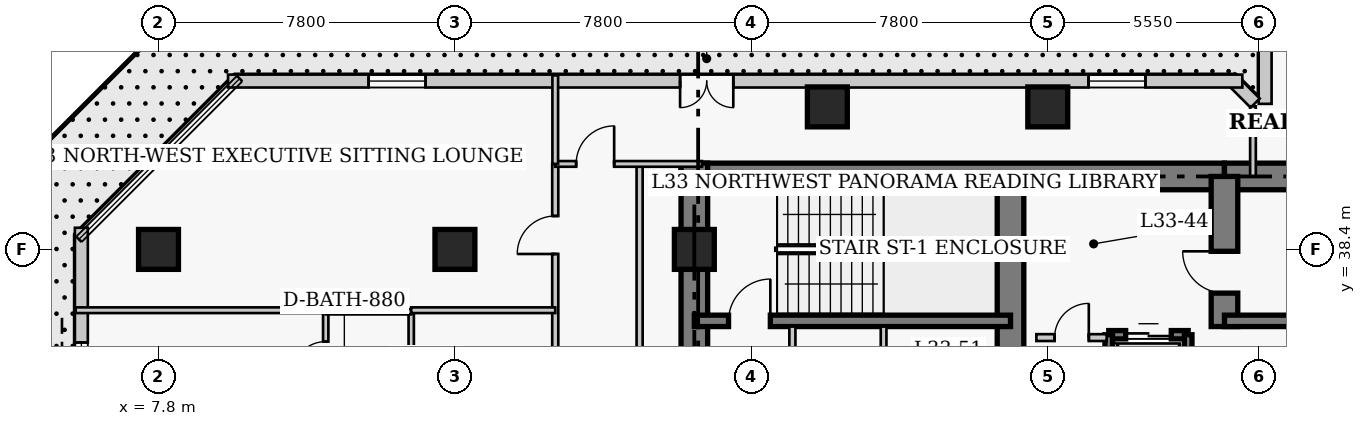
"""IFC4 building model, lengths in metres.
Left out: names, types, materials, properties, quantities, classifications, styles, units other than length and angle.
Written with IfcOpenShell. Run it as: python <this file> out.ifc"""

import sys

from ifc_helpers import new_model, si_unit, direction, frame, frame_2d, origin, origin_2d, place, context, subcontext, project, spatial, rectangle, extrude, element, fill, save


model = new_model("IFC4")
c1 = context("Model", 3, precision=1e-05, world=origin(), true_north=direction((0.0, 1.0)))
c2 = subcontext(c1, "Body", "Model", "MODEL_VIEW")
j1 = project(units=[si_unit("LENGTHUNIT", "METRE"), si_unit("PLANEANGLEUNIT", "RADIAN")], contexts=[c1])
p1 = place(None, origin())
s1 = spatial("IfcSite", under=j1, at=p1, CompositionType="ELEMENT")
p2 = place(p1, origin())
s2 = spatial("IfcBuilding", under=s1, at=p2, CompositionType="ELEMENT")
p3 = place(p2, frame((0.0, 0.0, 134.6)))
s3 = spatial("IfcBuildingStorey", under=s2, at=p3, CompositionType="ELEMENT", Elevation=134.6)
p4 = place(p3, frame((21.55, 40.32, 0.0), z_axis=(0.0, 0.0, 1.0), x_axis=(1.0, 0.0, 0.0)))
e1 = element("IfcWall", 1, at=p4, inside=s3, PredefinedType="SHEAR", context=c2, shape_type="SweptSolid", body=[
    extrude(rectangle(XDim=14.3, YDim=0.7, at=frame_2d((7.15, 0.0))), origin(), (0.0, 0.0, 1.0), 3.8),
])
p5 = place(p3, frame((35.85, 40.32, 0.0), z_axis=(0.0, 0.0, 1.0), x_axis=(1.0, 0.0, 0.0)))
e2 = element("IfcWall", 2, at=p5, inside=s3, PredefinedType="SHEAR", context=c2, shape_type="SweptSolid", body=[
    extrude(rectangle(XDim=12.6, YDim=0.7, at=frame_2d((6.3, 0.0))), origin(), (0.0, 0.0, 1.0), 3.8),
])
p6 = place(p3, frame((21.9, 27.05, 0.0), z_axis=(0.0, 0.0, 1.0), x_axis=(0.0, 1.0, 0.0)))
e3 = element("IfcWall", 3, at=p6, inside=s3, PredefinedType="SHEAR", context=c2, shape_type="SweptSolid", body=[
    extrude(rectangle(XDim=13.62, YDim=0.7, at=frame_2d((6.81, 0.0))), origin(), (0.0, 0.0, 1.0), 3.8),
])
p7 = place(p3, frame((30.22, 33.1, 0.0), z_axis=(0.0, 0.0, 1.0), x_axis=(0.0, 1.0, 0.0)))
e4 = element("IfcWall", 4, at=p7, inside=s3, PredefinedType="SHEAR", context=c2, shape_type="SweptSolid", body=[
    extrude(rectangle(XDim=7.22, YDim=0.7, at=frame_2d((3.61, 0.0))), origin(), (0.0, 0.0, 1.0), 3.8),
])
p8 = place(p3, frame((35.85, 36.37, 0.0), z_axis=(0.0, 0.0, 1.0), x_axis=(0.0, 1.0, 0.0)))
e5 = element("IfcWall", 5, at=p8, inside=s3, PredefinedType="SHEAR", context=c2, shape_type="SweptSolid", body=[
    extrude(rectangle(XDim=3.95, YDim=0.7, at=frame_2d((1.975, 0.0))), origin(), (0.0, 0.0, 1.0), 3.8),
])
p9 = place(p8, frame((0.88, 0.0, 0.0)))
e6 = element("IfcOpeningElement", 6, at=p9, cuts=e5, PredefinedType="OPENING", context=c2, shape_type="SweptSolid", body=[
    extrude(rectangle(XDim=1.1, YDim=2.15, at=frame_2d((0.55, 1.075))), frame((0.0, 0.36, 0.0), z_axis=(0.0, -1.0, 0.0), x_axis=(1.0, 0.0, 0.0)), (0.0, 0.0, 1.0), 0.72),
])
p10 = place(p3, frame((21.9, 36.52, 0.0), z_axis=(0.0, 0.0, 1.0), x_axis=(1.0, 0.0, 0.0)))
e7 = element("IfcWall", 7, at=p10, inside=s3, PredefinedType="SHEAR", context=c2, shape_type="SweptSolid", body=[
    extrude(rectangle(XDim=8.32, YDim=0.3, at=frame_2d((4.16, 0.0))), origin(), (0.0, 0.0, 1.0), 3.8),
])
p11 = place(p10, frame((0.9, 0.0, 0.0)))
e8 = element("IfcOpeningElement", 8, at=p11, cuts=e7, PredefinedType="OPENING", context=c2, shape_type="SweptSolid", body=[
    extrude(rectangle(XDim=1.1, YDim=2.15, at=frame_2d((0.55, 1.075))), frame((0.0, 0.16, 0.0), z_axis=(0.0, -1.0, 0.0), x_axis=(1.0, 0.0, 0.0)), (0.0, 0.0, 1.0), 0.32),
])
p12 = place(p3, frame((35.85, 36.52, 0.0), z_axis=(0.0, 0.0, 1.0), x_axis=(1.0, 0.0, 0.0)))
e9 = element("IfcWall", 9, at=p12, inside=s3, PredefinedType="SHEAR", context=c2, shape_type="SweptSolid", body=[
    extrude(rectangle(XDim=8.33, YDim=0.3, at=frame_2d((4.165, 0.0))), origin(), (0.0, 0.0, 1.0), 3.8),
])
for number, where, z_axis, x_axis in (
    (10, (7.8, 38.4, 0.0), (0.0, 0.0, 1.0), (1.0, 0.0, 0.0)),
    (11, (15.6, 38.4, 0.0), (0.0, 0.0, 1.0), (1.0, 0.0, 0.0)),
    (12, (21.9, 38.4, 0.0), (0.0, 0.0, 1.0), (1.0, 0.0, 0.0)),
    (13, (25.4, 42.15, 0.0), (0.0, 0.0, 1.0), (1.0, 0.0, 0.0)),
    (14, (31.2, 42.15, 0.0), (0.0, 0.0, 1.0), (1.0, 0.0, 0.0)),
):
    element("IfcColumn", number, at=place(p3, frame(where, z_axis=z_axis, x_axis=x_axis)), inside=s3, PredefinedType="COLUMN", context=c2, shape_type="SweptSolid", body=[
        extrude(rectangle(XDim=1.05, YDim=1.05, at=origin_2d()), origin(), (0.0, 0.0, 1.0), 3.8),
    ])
p13 = place(p3, frame((36.92, 44.37, 0.0), z_axis=(0.0, 0.0, 1.0), x_axis=(0.0, -1.0, 0.0)))
e15 = element("IfcWall", 15, at=p13, inside=s3, PredefinedType="SOLIDWALL", context=c2, shape_type="SweptSolid", body=[
    extrude(rectangle(XDim=2.14, YDim=0.34, at=frame_2d((1.07, 0.0))), origin(), (0.0, 0.0, 1.0), 3.55),
])
p14 = place(p3, frame((36.658, 42.251, 0.0), z_axis=(0.0, 0.0, 1.0), x_axis=(-0.707106781187, 0.707106781187, 0.0)))
e16 = element("IfcWall", 16, at=p14, inside=s3, PredefinedType="SOLIDWALL", context=c2, shape_type="SweptSolid", body=[
    extrude(rectangle(XDim=0.929, YDim=0.34, at=frame_2d((0.464, 0.0))), origin(), (0.0, 0.0, 1.0), 3.55),
])
p15 = place(p3, frame((36.32, 42.83, 0.0), z_axis=(0.0, 0.0, 1.0), x_axis=(-1.0, 0.0, 0.0)))
e17 = element("IfcWall", 17, at=p15, inside=s3, PredefinedType="SOLIDWALL", context=c2, shape_type="SweptSolid", body=[
    extrude(rectangle(XDim=26.69, YDim=0.34, at=frame_2d((13.345, 0.0))), origin(), (0.0, 0.0, 1.0), 3.55),
])
p16 = place(p15, frame((13.395, 0.0, 0.0)))
e18 = element("IfcOpeningElement", 18, at=p16, cuts=e17, PredefinedType="OPENING", context=c2, shape_type="SweptSolid", body=[
    extrude(rectangle(XDim=1.4, YDim=2.15, at=frame_2d((0.7, 1.075))), frame((0.0, 0.18, 0.0), z_axis=(0.0, -1.0, 0.0), x_axis=(1.0, 0.0, 0.0)), (0.0, 0.0, 1.0), 0.36),
])
p17 = place(p15, frame((2.548, 0.0, 0.85)))
e19 = element("IfcOpeningElement", 19, at=p17, cuts=e17, PredefinedType="OPENING", context=c2, shape_type="SweptSolid", body=[
    extrude(rectangle(XDim=1.5, YDim=1.75, at=frame_2d((0.75, 0.875))), frame((0.0, 0.18, 0.0), z_axis=(0.0, -1.0, 0.0), x_axis=(1.0, 0.0, 0.0)), (0.0, 0.0, 1.0), 0.36),
])
p18 = place(p15, frame((21.492, 0.0, 0.85)))
e20 = element("IfcOpeningElement", 20, at=p18, cuts=e17, PredefinedType="OPENING", context=c2, shape_type="SweptSolid", body=[
    extrude(rectangle(XDim=1.5, YDim=1.75, at=frame_2d((0.75, 0.875))), frame((0.0, 0.18, 0.0), z_axis=(0.0, -1.0, 0.0), x_axis=(1.0, 0.0, 0.0)), (0.0, 0.0, 1.0), 0.36),
])
p19 = place(p3, frame((5.77, 38.97, 0.0), z_axis=(0.0, 0.0, 1.0), x_axis=(0.0, -1.0, 0.0)))
e21 = element("IfcWall", 21, at=p19, inside=s3, PredefinedType="SOLIDWALL", context=c2, shape_type="SweptSolid", body=[
    extrude(rectangle(XDim=30.14, YDim=0.34, at=frame_2d((15.07, 0.0))), origin(), (0.0, 0.0, 1.0), 3.55),
])
p20 = place(p19, frame((3.018, 0.0, 0.85)))
e22 = element("IfcOpeningElement", 22, at=p20, cuts=e21, PredefinedType="OPENING", context=c2, shape_type="SweptSolid", body=[
    extrude(rectangle(XDim=1.5, YDim=1.75, at=frame_2d((0.75, 0.875))), frame((0.0, 0.18, 0.0), z_axis=(0.0, -1.0, 0.0), x_axis=(1.0, 0.0, 0.0)), (0.0, 0.0, 1.0), 0.36),
])
p21 = place(p19, frame((10.552, 0.0, 0.85)))
e23 = element("IfcOpeningElement", 23, at=p21, cuts=e21, PredefinedType="OPENING", context=c2, shape_type="SweptSolid", body=[
    extrude(rectangle(XDim=1.5, YDim=1.75, at=frame_2d((0.75, 0.875))), frame((0.0, 0.18, 0.0), z_axis=(0.0, -1.0, 0.0), x_axis=(1.0, 0.0, 0.0)), (0.0, 0.0, 1.0), 0.36),
])
p22 = place(p19, frame((18.087, 0.0, 0.85)))
e24 = element("IfcOpeningElement", 24, at=p22, cuts=e21, PredefinedType="OPENING", context=c2, shape_type="SweptSolid", body=[
    extrude(rectangle(XDim=1.5, YDim=1.75, at=frame_2d((0.75, 0.875))), frame((0.0, 0.18, 0.0), z_axis=(0.0, -1.0, 0.0), x_axis=(1.0, 0.0, 0.0)), (0.0, 0.0, 1.0), 0.36),
])
p23 = place(p19, frame((25.623, 0.0, 0.85)))
e25 = element("IfcOpeningElement", 25, at=p23, cuts=e21, PredefinedType="OPENING", context=c2, shape_type="SweptSolid", body=[
    extrude(rectangle(XDim=1.5, YDim=1.75, at=frame_2d((0.75, 0.875))), frame((0.0, 0.18, 0.0), z_axis=(0.0, -1.0, 0.0), x_axis=(1.0, 0.0, 0.0)), (0.0, 0.0, 1.0), 0.36),
])
p24 = place(p3, frame((32.805, 36.155, 0.0), z_axis=(0.0, 0.0, 1.0), x_axis=(1.0, 0.0, 0.0)))
e26 = element("IfcWall", 26, at=p24, inside=s3, PredefinedType="SHEAR", context=c2, shape_type="SweptSolid", body=[
    extrude(rectangle(XDim=2.09, YDim=0.22, at=frame_2d((1.045, 0.0))), origin(), (0.0, 0.0, 1.0), 3.8),
])
p25 = place(p24, frame((0.445, 0.0, 0.0)))
e27 = element("IfcOpeningElement", 27, at=p25, cuts=e26, PredefinedType="OPENING", context=c2, shape_type="SweptSolid", body=[
    extrude(rectangle(XDim=1.2, YDim=2.15, at=frame_2d((0.6, 1.075))), frame((0.0, 0.12, 0.0), z_axis=(0.0, -1.0, 0.0), x_axis=(1.0, 0.0, 0.0)), (0.0, 0.0, 1.0), 0.24),
])
for number, where, z_axis, x_axis in (
    (28, (32.805, 33.245, 0.0), (0.0, 0.0, 1.0), (0.0, 1.0, 0.0)),
    (29, (34.895, 33.245, 0.0), (0.0, 0.0, 1.0), (0.0, 1.0, 0.0)),
):
    element("IfcWall", number, at=place(p3, frame(where, z_axis=z_axis, x_axis=x_axis)), inside=s3, PredefinedType="SHEAR", context=c2, shape_type="SweptSolid", body=[
        extrude(rectangle(XDim=2.91, YDim=0.2, at=frame_2d((1.455, 0.0))), origin(), (0.0, 0.0, 1.0), 3.8),
    ])
p26 = place(p3, frame((30.9, 36.08, 0.0), z_axis=(0.0, 0.0, 1.0), x_axis=(1.0, 0.0, 0.0)))
e30 = element("IfcWall", 30, at=p26, inside=s3, PredefinedType="PARTITIONING", context=c2, shape_type="SweptSolid", body=[
    extrude(rectangle(XDim=1.85, YDim=0.18, at=frame_2d((0.925, 0.0))), origin(), (0.0, 0.0, 1.0), 3.55),
])
p27 = place(p26, frame((0.48, 0.0, 0.0)))
e31 = element("IfcOpeningElement", 31, at=p27, cuts=e30, PredefinedType="OPENING", context=c2, shape_type="SweptSolid", body=[
    extrude(rectangle(XDim=0.9, YDim=2.15, at=frame_2d((0.45, 1.075))), frame((0.0, 0.1, 0.0), z_axis=(0.0, -1.0, 0.0), x_axis=(1.0, 0.0, 0.0)), (0.0, 0.0, 1.0), 0.2),
])
p28 = place(p3, frame((24.48, 32.8, 0.0), z_axis=(0.0, 0.0, 1.0), x_axis=(0.0, 1.0, 0.0)))
e32 = element("IfcWall", 32, at=p28, inside=s3, PredefinedType="PARTITIONING", context=c2, shape_type="SweptSolid", body=[
    extrude(rectangle(XDim=3.57, YDim=0.16, at=frame_2d((1.785, 0.0))), origin(), (0.0, 0.0, 1.0), 3.55),
])
p29 = place(p28, frame((1.604, 0.0, 0.0)))
e33 = element("IfcOpeningElement", 33, at=p29, cuts=e32, PredefinedType="OPENING", context=c2, shape_type="SweptSolid", body=[
    extrude(rectangle(XDim=0.9, YDim=2.1, at=frame_2d((0.45, 1.05))), frame((0.0, 0.09, 0.0), z_axis=(0.0, -1.0, 0.0), x_axis=(1.0, 0.0, 0.0)), (0.0, 0.0, 1.0), 0.18),
])
p30 = place(p3, frame((26.88, 32.75, 0.0), z_axis=(0.0, 0.0, 1.0), x_axis=(0.0, 1.0, 0.0)))
e34 = element("IfcWall", 34, at=p30, inside=s3, PredefinedType="PARTITIONING", context=c2, shape_type="SweptSolid", body=[
    extrude(rectangle(XDim=3.62, YDim=0.15, at=frame_2d((1.81, 0.0))), origin(), (0.0, 0.0, 1.0), 3.55),
])
p31 = place(p3, frame((18.24, 6.85, 0.0), z_axis=(0.0, 0.0, 1.0), x_axis=(0.0, 1.0, 0.0)))
e35 = element("IfcWall", 35, at=p31, inside=s3, PredefinedType="PARTITIONING", context=c2, shape_type="SweptSolid", body=[
    extrude(rectangle(XDim=33.8, YDim=0.16, at=frame_2d((16.9, 0.0))), origin(), (0.0, 0.0, 1.0), 3.55),
])
p32 = place(p31, frame((1.7, 0.0, 0.0)))
e36 = element("IfcOpeningElement", 36, at=p32, cuts=e35, PredefinedType="OPENING", context=c2, shape_type="SweptSolid", body=[
    extrude(rectangle(XDim=0.95, YDim=2.1, at=frame_2d((0.475, 1.05))), frame((0.0, 0.09, 0.0), z_axis=(0.0, -1.0, 0.0), x_axis=(1.0, 0.0, 0.0)), (0.0, 0.0, 1.0), 0.18),
])
p33 = place(p31, frame((12.675, 0.0, 0.0)))
e37 = element("IfcOpeningElement", 37, at=p33, cuts=e35, PredefinedType="OPENING", context=c2, shape_type="SweptSolid", body=[
    extrude(rectangle(XDim=0.95, YDim=2.1, at=frame_2d((0.475, 1.05))), frame((0.0, 0.09, 0.0), z_axis=(0.0, -1.0, 0.0), x_axis=(1.0, 0.0, 0.0)), (0.0, 0.0, 1.0), 0.18),
])
p34 = place(p31, frame((25.475, 0.0, 0.0)))
e38 = element("IfcOpeningElement", 38, at=p34, cuts=e35, PredefinedType="OPENING", context=c2, shape_type="SweptSolid", body=[
    extrude(rectangle(XDim=0.95, YDim=2.1, at=frame_2d((0.475, 1.05))), frame((0.0, 0.09, 0.0), z_axis=(0.0, -1.0, 0.0), x_axis=(1.0, 0.0, 0.0)), (0.0, 0.0, 1.0), 0.18),
])
p35 = place(p31, frame((31.43, 0.0, 0.0)))
e39 = element("IfcOpeningElement", 39, at=p35, cuts=e35, PredefinedType="OPENING", context=c2, shape_type="SweptSolid", body=[
    extrude(rectangle(XDim=1.0, YDim=2.15, at=frame_2d((0.5, 1.075))), frame((0.0, 0.09, 0.0), z_axis=(0.0, -1.0, 0.0), x_axis=(1.0, 0.0, 0.0)), (0.0, 0.0, 1.0), 0.18),
])
p36 = place(p3, frame((20.46, 35.02, 0.0), z_axis=(0.0, 0.0, 1.0), x_axis=(0.0, 1.0, 0.0)))
e40 = element("IfcWall", 40, at=p36, inside=s3, PredefinedType="PARTITIONING", context=c2, shape_type="SweptSolid", body=[
    extrude(rectangle(XDim=5.63, YDim=0.16, at=frame_2d((2.815, 0.0))), origin(), (0.0, 0.0, 1.0), 3.55),
])
p37 = place(p3, frame((18.24, 40.65, 0.0), z_axis=(0.0, 0.0, 1.0), x_axis=(1.0, 0.0, 0.0)))
e41 = element("IfcWall", 41, at=p37, inside=s3, PredefinedType="PARTITIONING", context=c2, shape_type="SweptSolid", body=[
    extrude(rectangle(XDim=3.86, YDim=0.15, at=frame_2d((1.93, 0.0))), origin(), (0.0, 0.0, 1.0), 3.55),
])
p38 = place(p37, frame((0.55, 0.0, 0.0)))
e42 = element("IfcOpeningElement", 42, at=p38, cuts=e41, PredefinedType="OPENING", context=c2, shape_type="SweptSolid", body=[
    extrude(rectangle(XDim=1.0, YDim=2.15, at=frame_2d((0.5, 1.075))), frame((0.0, 0.085, 0.0), z_axis=(0.0, -1.0, 0.0), x_axis=(1.0, 0.0, 0.0)), (0.0, 0.0, 1.0), 0.17),
])
p39 = place(p3, frame((18.24, 40.65, 0.0), z_axis=(0.0, 0.0, 1.0), x_axis=(0.0, 1.0, 0.0)))
e43 = element("IfcWall", 43, at=p39, inside=s3, PredefinedType="PARTITIONING", context=c2, shape_type="SweptSolid", body=[
    extrude(rectangle(XDim=2.33, YDim=0.15, at=frame_2d((1.165, 0.0))), origin(), (0.0, 0.0, 1.0), 3.55),
])
p40 = place(p3, frame((36.6, 40.32, 0.0), z_axis=(0.0, 0.0, 1.0), x_axis=(0.0, 1.0, 0.0)))
e44 = element("IfcWall", 44, at=p40, inside=s3, PredefinedType="PARTITIONING", context=c2, shape_type="SweptSolid", body=[
    extrude(rectangle(XDim=1.845, YDim=0.15, at=frame_2d((0.922, 0.0))), origin(), (0.0, 0.0, 1.0), 3.55),
])
p41 = place(p3, frame((12.2, 34.31, 0.0), z_axis=(0.0, 0.0, 1.0), x_axis=(0.0, 1.0, 0.0)))
e45 = element("IfcWall", 45, at=p41, inside=s3, PredefinedType="PLUMBINGWALL", context=c2, shape_type="SweptSolid", body=[
    extrude(rectangle(XDim=2.45, YDim=0.14, at=frame_2d((1.225, 0.0))), origin(), (0.0, 0.0, 1.0), 3.55),
])
p42 = place(p41, frame((0.785, 0.0, 0.0)))
e46 = element("IfcOpeningElement", 46, at=p42, cuts=e45, PredefinedType="OPENING", context=c2, shape_type="SweptSolid", body=[
    extrude(rectangle(XDim=0.88, YDim=2.05, at=frame_2d((0.44, 1.025))), frame((0.0, 0.08, 0.0), z_axis=(0.0, -1.0, 0.0), x_axis=(1.0, 0.0, 0.0)), (0.0, 0.0, 1.0), 0.16),
])
p43 = place(p3, frame((14.45, 34.31, 0.0), z_axis=(0.0, 0.0, 1.0), x_axis=(0.0, 1.0, 0.0)))
e47 = element("IfcWall", 47, at=p43, inside=s3, PredefinedType="PLUMBINGWALL", context=c2, shape_type="SweptSolid", body=[
    extrude(rectangle(XDim=2.45, YDim=0.14, at=frame_2d((1.225, 0.0))), origin(), (0.0, 0.0, 1.0), 3.55),
])
p44 = place(p3, frame((12.2, 36.76, 0.0), z_axis=(0.0, 0.0, 1.0), x_axis=(1.0, 0.0, 0.0)))
e48 = element("IfcWall", 48, at=p44, inside=s3, PredefinedType="PLUMBINGWALL", context=c2, shape_type="SweptSolid", body=[
    extrude(rectangle(XDim=2.25, YDim=0.14, at=frame_2d((1.125, 0.0))), origin(), (0.0, 0.0, 1.0), 3.55),
])
p45 = place(p3, frame((5.62, 36.8, 0.0), z_axis=(0.0, 0.0, 1.0), x_axis=(1.0, 0.0, 0.0)))
e49 = element("IfcWall", 49, at=p45, inside=s3, PredefinedType="PARTITIONING", context=c2, shape_type="SweptSolid", body=[
    extrude(rectangle(XDim=6.58, YDim=0.15, at=frame_2d((3.29, 0.0))), origin(), (0.0, 0.0, 1.0), 3.55),
])
p46 = place(p3, frame((14.45, 36.8, 0.0), z_axis=(0.0, 0.0, 1.0), x_axis=(1.0, 0.0, 0.0)))
e50 = element("IfcWall", 50, at=p46, inside=s3, PredefinedType="PARTITIONING", context=c2, shape_type="SweptSolid", body=[
    extrude(rectangle(XDim=3.79, YDim=0.15, at=frame_2d((1.895, 0.0))), origin(), (0.0, 0.0, 1.0), 3.55),
])
p47 = place(p16, origin())
e51 = element("IfcDoor", 51, at=p47, inside=s3, OperationType="DOUBLE_DOOR_SINGLE_SWING", PredefinedType="DOOR", context=c2, shape_type="SweptSolid", body=[
    extrude(rectangle(XDim=1.4, YDim=2.15, at=frame_2d((0.7, 1.075))), frame((0.0, 0.025, 0.0), z_axis=(0.0, -1.0, 0.0), x_axis=(1.0, 0.0, 0.0)), (0.0, 0.0, 1.0), 0.05),
])
fill(e18, e51)
p48 = place(p17, origin())
e52 = element("IfcWindow", 52, at=p48, inside=s3, PartitioningType="SINGLE_PANEL", PredefinedType="WINDOW", context=c2, shape_type="SweptSolid", body=[
    extrude(rectangle(XDim=1.5, YDim=1.75, at=frame_2d((0.75, 0.875))), frame((0.0, 0.03, 0.0), z_axis=(0.0, -1.0, 0.0), x_axis=(1.0, 0.0, 0.0)), (0.0, 0.0, 1.0), 0.06),
])
fill(e19, e52)
p49 = place(p18, origin())
e53 = element("IfcWindow", 53, at=p49, inside=s3, PartitioningType="SINGLE_PANEL", PredefinedType="WINDOW", context=c2, shape_type="SweptSolid", body=[
    extrude(rectangle(XDim=1.5, YDim=1.75, at=frame_2d((0.75, 0.875))), frame((0.0, 0.03, 0.0), z_axis=(0.0, -1.0, 0.0), x_axis=(1.0, 0.0, 0.0)), (0.0, 0.0, 1.0), 0.06),
])
fill(e20, e53)
p50 = place(p20, origin())
e54 = element("IfcWindow", 54, at=p50, inside=s3, PartitioningType="SINGLE_PANEL", PredefinedType="WINDOW", context=c2, shape_type="SweptSolid", body=[
    extrude(rectangle(XDim=1.5, YDim=1.75, at=frame_2d((0.75, 0.875))), frame((0.0, 0.03, 0.0), z_axis=(0.0, -1.0, 0.0), x_axis=(1.0, 0.0, 0.0)), (0.0, 0.0, 1.0), 0.06),
])
fill(e22, e54)
p51 = place(p25, origin())
e55 = element("IfcDoor", 55, at=p51, inside=s3, OperationType="DOUBLE_DOOR_SLIDING", PredefinedType="DOOR", context=c2, shape_type="SweptSolid", body=[
    extrude(rectangle(XDim=1.2, YDim=2.15, at=frame_2d((0.6, 1.075))), frame((0.0, 0.025, 0.0), z_axis=(0.0, -1.0, 0.0), x_axis=(1.0, 0.0, 0.0)), (0.0, 0.0, 1.0), 0.05),
])
fill(e27, e55)
p52 = place(p27, origin())
e56 = element("IfcDoor", 56, at=p52, inside=s3, OperationType="SINGLE_SWING_RIGHT", PredefinedType="DOOR", context=c2, shape_type="SweptSolid", body=[
    extrude(rectangle(XDim=0.9, YDim=2.15, at=frame_2d((0.45, 1.075))), frame((0.0, 0.025, 0.0), z_axis=(0.0, -1.0, 0.0), x_axis=(1.0, 0.0, 0.0)), (0.0, 0.0, 1.0), 0.05),
])
fill(e31, e56)
p53 = place(p38, origin())
e57 = element("IfcDoor", 57, at=p53, inside=s3, OperationType="SINGLE_SWING_RIGHT", PredefinedType="DOOR", context=c2, shape_type="SweptSolid", body=[
    extrude(rectangle(XDim=1.0, YDim=2.15, at=frame_2d((0.5, 1.075))), frame((0.0, 0.025, 0.0), z_axis=(0.0, -1.0, 0.0), x_axis=(1.0, 0.0, 0.0)), (0.0, 0.0, 1.0), 0.05),
])
fill(e42, e57)
p54 = place(p42, origin())
e58 = element("IfcDoor", 58, at=p54, inside=s3, OperationType="SINGLE_SWING_LEFT", PredefinedType="DOOR", context=c2, shape_type="SweptSolid", body=[
    extrude(rectangle(XDim=0.88, YDim=2.05, at=frame_2d((0.44, 1.025))), frame((0.0, 0.025, 0.0), z_axis=(0.0, -1.0, 0.0), x_axis=(1.0, 0.0, 0.0)), (0.0, 0.0, 1.0), 0.05),
])
fill(e46, e58)
p55 = place(p35, origin())
e59 = element("IfcDoor", 59, at=p55, inside=s3, OperationType="SINGLE_SWING_LEFT", PredefinedType="DOOR", context=c2, shape_type="SweptSolid", body=[
    extrude(rectangle(XDim=1.0, YDim=2.15, at=frame_2d((0.5, 1.075))), frame((0.0, 0.025, 0.0), z_axis=(0.0, -1.0, 0.0), x_axis=(1.0, 0.0, 0.0)), (0.0, 0.0, 1.0), 0.05),
])
fill(e39, e59)
p56 = place(p11, origin())
e60 = element("IfcDoor", 60, at=p56, inside=s3, OperationType="SINGLE_SWING_RIGHT", PredefinedType="DOOR", context=c2, shape_type="SweptSolid", body=[
    extrude(rectangle(XDim=1.1, YDim=2.15, at=frame_2d((0.55, 1.075))), frame((0.0, 0.025, 0.0), z_axis=(0.0, -1.0, 0.0), x_axis=(1.0, 0.0, 0.0)), (0.0, 0.0, 1.0), 0.05),
])
fill(e8, e60)
p57 = place(p9, origin())
e61 = element("IfcDoor", 61, at=p57, inside=s3, OperationType="SINGLE_SWING_RIGHT", PredefinedType="DOOR", context=c2, shape_type="SweptSolid", body=[
    extrude(rectangle(XDim=1.1, YDim=2.15, at=frame_2d((0.55, 1.075))), frame((0.0, 0.025, 0.0), z_axis=(0.0, -1.0, 0.0), x_axis=(1.0, 0.0, 0.0)), (0.0, 0.0, 1.0), 0.05),
])
fill(e6, e61)
save(model, sys.argv[1])
